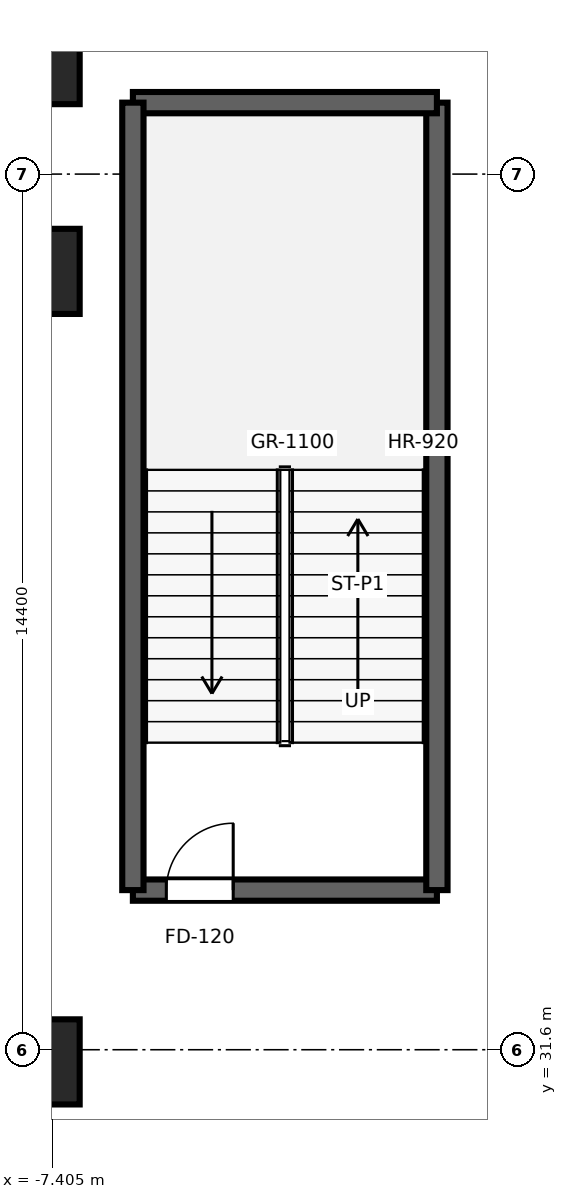
"""IFC4 building model, lengths in metres.
Left out: names, types, materials, properties, quantities, classifications, styles, units other than length and angle.
Written with IfcOpenShell. Run it as: python <this file> out.ifc"""

import sys

from ifc_helpers import new_model, si_unit, direction, frame, frame_2d, origin, origin_2d, place, context, subcontext, project, spatial, rectangle, extrude, source, transform, mapped, element, fill, save


model = new_model("IFC4")
c1 = context("Model", 3, precision=1e-05, world=origin(), true_north=direction((0.0, 1.0)))
c2 = subcontext(c1, "Body", "Model", "MODEL_VIEW")
j1 = project(units=[si_unit("LENGTHUNIT", "METRE"), si_unit("PLANEANGLEUNIT", "RADIAN")], contexts=[c1])
p1 = place(None, origin())
s1 = spatial("IfcSite", under=j1, at=p1, CompositionType="ELEMENT")
p2 = place(p1, origin())
s2 = spatial("IfcBuilding", under=s1, at=p2, CompositionType="ELEMENT")
p3 = place(p2, frame((0.0, 0.0, 11.0)))
s3 = spatial("IfcBuildingStorey", under=s2, at=p3, CompositionType="ELEMENT", Elevation=11.0)
p4 = place(p3, frame((-6.075, 34.225, 0.0), z_axis=(0.0, 0.0, 1.0), x_axis=(1.0, 0.0, 0.0)))
e1 = element("IfcWall", 1, at=p4, inside=s3, PredefinedType="SHEAR", context=c2, shape_type="SweptSolid", body=[
    extrude(rectangle(XDim=5.0, YDim=0.35, at=frame_2d((2.5, 0.0))), origin(), (0.0, 0.0, 1.0), 5.0),
])
p5 = place(p4, frame((0.55, 0.0, 0.0)))
e2 = element("IfcOpeningElement", 2, at=p5, cuts=e1, PredefinedType="OPENING", context=c2, shape_type="SweptSolid", body=[
    extrude(rectangle(XDim=1.1, YDim=2.12, at=frame_2d((0.55, 1.06))), frame((0.0, 0.185, 0.0), z_axis=(0.0, -1.0, 0.0), x_axis=(1.0, 0.0, 0.0)), (0.0, 0.0, 1.0), 0.37),
])
p6 = place(p3, frame((-1.075, 34.225, 0.0), z_axis=(0.0, 0.0, 1.0), x_axis=(0.0, 1.0, 0.0)))
e3 = element("IfcWall", 3, at=p6, inside=s3, PredefinedType="SHEAR", context=c2, shape_type="SweptSolid", body=[
    extrude(rectangle(XDim=12.95, YDim=0.35, at=frame_2d((6.475, 0.0))), origin(), (0.0, 0.0, 1.0), 5.0),
])
p7 = place(p3, frame((-1.075, 47.175, 0.0), z_axis=(0.0, 0.0, 1.0), x_axis=(-1.0, 0.0, 0.0)))
e4 = element("IfcWall", 4, at=p7, inside=s3, PredefinedType="SHEAR", context=c2, shape_type="SweptSolid", body=[
    extrude(rectangle(XDim=5.0, YDim=0.35, at=frame_2d((2.5, 0.0))), origin(), (0.0, 0.0, 1.0), 5.0),
])
p8 = place(p3, frame((-6.075, 47.175, 0.0), z_axis=(0.0, 0.0, 1.0), x_axis=(0.0, -1.0, 0.0)))
e5 = element("IfcWall", 5, at=p8, inside=s3, PredefinedType="SHEAR", context=c2, shape_type="SweptSolid", body=[
    extrude(rectangle(XDim=12.95, YDim=0.35, at=frame_2d((6.475, 0.0))), origin(), (0.0, 0.0, 1.0), 5.0),
])
m1 = source(origin(), c2, "Body", "SweptSolid", [
    extrude(rectangle(XDim=1.4, YDim=1.4, at=origin_2d()), origin(), (0.0, 0.0, 1.0), 5.0),
])
for number, where, z_axis, x_axis in (
    (6, (-7.65, 31.4, 0.0), (0.0, 0.0, 1.0), (1.0, 0.0, 0.0)),
    (7, (-7.65, 44.4, 0.0), (0.0, 0.0, 1.0), (1.0, 0.0, 0.0)),
    (8, (-7.65, 47.85, 0.0), (0.0, 0.0, 1.0), (1.0, 0.0, 0.0)),
):
    element("IfcColumn", number, at=place(p3, frame(where, z_axis=z_axis, x_axis=x_axis)), inside=s3, PredefinedType="COLUMN", context=c2, shape_type="MappedRepresentation", body=[
        mapped(m1, transform((0.0, 0.0, 0.0), x_axis=(1.0, 0.0, 0.0), y_axis=(0.0, 1.0, 0.0), z_axis=(0.0, 0.0, 1.0), scale=1.0)),
    ])
m2 = source(origin(), c2, "Body", "SweptSolid", [
    extrude(rectangle(XDim=1.1, YDim=2.12, at=frame_2d((0.55, 1.06))), frame((0.0, 0.025, 0.0), z_axis=(0.0, -1.0, 0.0), x_axis=(1.0, 0.0, 0.0)), (0.0, 0.0, 1.0), 0.05),
])
p9 = place(p5, origin())
e9 = element("IfcDoor", 9, at=p9, inside=s3, OperationType="SINGLE_SWING_RIGHT", PredefinedType="DOOR", context=c2, shape_type="MappedRepresentation", body=[
    mapped(m2, transform((0.0, 0.0, 0.0), x_axis=(1.0, 0.0, 0.0), y_axis=(0.0, 1.0, 0.0), z_axis=(0.0, 0.0, 1.0), scale=1.0)),
])
fill(e2, e9)
save(model, sys.argv[1])
